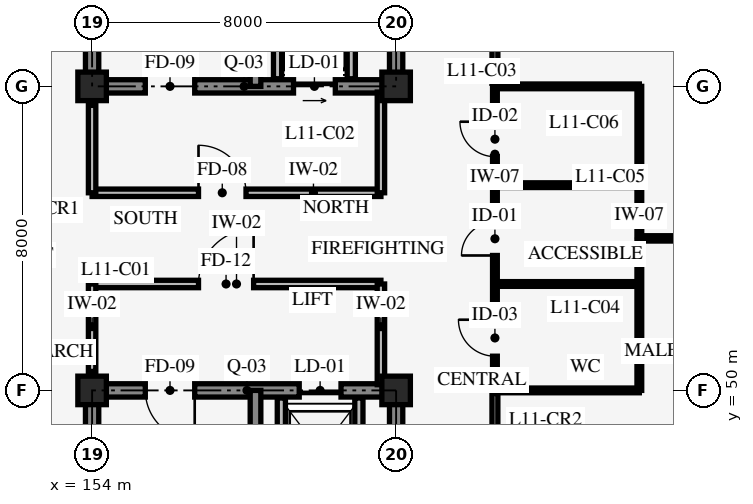
"""IFC4 building model, lengths in metres.
Left out: names, types, materials, properties, quantities, classifications, styles, units other than length and angle.
Written with IfcOpenShell. Run it as: python <this file> out.ifc"""

import sys

from ifc_helpers import new_model, si_unit, direction, frame, frame_2d, origin, origin_2d, place, context, subcontext, project, spatial, rectangle, extrude, element, fill, save


model = new_model("IFC4")
c1 = context("Model", 3, precision=1e-05, world=origin(), true_north=direction((0.0, 1.0)))
c2 = subcontext(c1, "Body", "Model", "MODEL_VIEW")
j1 = project(units=[si_unit("LENGTHUNIT", "METRE"), si_unit("PLANEANGLEUNIT", "RADIAN")], contexts=[c1])
p1 = place(None, origin())
s1 = spatial("IfcSite", under=j1, at=p1, CompositionType="ELEMENT")
p2 = place(p1, origin())
s2 = spatial("IfcBuilding", under=s1, at=p2, CompositionType="ELEMENT")
p3 = place(p2, frame((0.0, 0.0, 44.4)))
s3 = spatial("IfcBuildingStorey", under=s2, at=p3, CompositionType="ELEMENT", Elevation=44.4)
p4 = place(p3, frame((162.0, 42.0, 0.0), z_axis=(0.0, 0.0, 1.0), x_axis=(0.0, 1.0, 0.0)))
e1 = element("IfcWall", 1, at=p4, inside=s3, PredefinedType="SHEAR", context=c2, shape_type="SweptSolid", body=[
    extrude(rectangle(XDim=8.0, YDim=0.35, at=frame_2d((4.0, 0.0))), origin(), (0.0, 0.0, 1.0), 3.95),
])
p5 = place(p4, frame((3.175, 0.0, 0.0)))
e2 = element("IfcOpeningElement", 2, at=p5, cuts=e1, PredefinedType="OPENING", context=c2, shape_type="SweptSolid", body=[
    extrude(rectangle(XDim=1.05, YDim=2.2, at=frame_2d((0.525, 1.1))), frame((0.0, 0.185, 0.0), z_axis=(0.0, -1.0, 0.0), x_axis=(1.0, 0.0, 0.0)), (0.0, 0.0, 1.0), 0.37),
])
p6 = place(p3, frame((162.0, 50.0, 0.0), z_axis=(0.0, 0.0, 1.0), x_axis=(-1.0, 0.0, 0.0)))
e3 = element("IfcWall", 3, at=p6, inside=s3, PredefinedType="SHEAR", context=c2, shape_type="SweptSolid", body=[
    extrude(rectangle(XDim=8.0, YDim=0.35, at=frame_2d((4.0, 0.0))), origin(), (0.0, 0.0, 1.0), 3.95),
])
p7 = place(p6, frame((5.3, 0.0, 0.0)))
e4 = element("IfcOpeningElement", 4, at=p7, cuts=e3, PredefinedType="OPENING", context=c2, shape_type="SweptSolid", body=[
    extrude(rectangle(XDim=1.3, YDim=2.15, at=frame_2d((0.65, 1.075))), frame((0.0, 0.185, 0.0), z_axis=(0.0, -1.0, 0.0), x_axis=(1.0, 0.0, 0.0)), (0.0, 0.0, 1.0), 0.37),
])
p8 = place(p6, frame((1.45, 0.0, 0.0)))
e5 = element("IfcOpeningElement", 5, at=p8, cuts=e3, PredefinedType="OPENING", context=c2, shape_type="SweptSolid", body=[
    extrude(rectangle(XDim=1.1, YDim=2.2, at=frame_2d((0.55, 1.1))), frame((0.0, 0.185, 0.0), z_axis=(0.0, -1.0, 0.0), x_axis=(1.0, 0.0, 0.0)), (0.0, 0.0, 1.0), 0.37),
])
p9 = place(p3, frame((154.0, 50.0, 0.0), z_axis=(0.0, 0.0, 1.0), x_axis=(0.0, -1.0, 0.0)))
e6 = element("IfcWall", 6, at=p9, inside=s3, PredefinedType="SHEAR", context=c2, shape_type="SweptSolid", body=[
    extrude(rectangle(XDim=8.0, YDim=0.35, at=frame_2d((4.0, 0.0))), origin(), (0.0, 0.0, 1.0), 3.95),
])
p10 = place(p3, frame((158.3, 42.0, 0.0), z_axis=(0.0, 0.0, 1.0), x_axis=(0.0, 1.0, 0.0)))
e7 = element("IfcWall", 7, at=p10, inside=s3, PredefinedType="SHEAR", context=c2, shape_type="SweptSolid", body=[
    extrude(rectangle(XDim=8.0, YDim=0.28, at=frame_2d((4.0, 0.0))), origin(), (0.0, 0.0, 1.0), 3.95),
])
p11 = place(p3, frame((154.0, 58.0, 0.0), z_axis=(0.0, 0.0, 1.0), x_axis=(1.0, 0.0, 0.0)))
e8 = element("IfcWall", 8, at=p11, inside=s3, PredefinedType="SHEAR", context=c2, shape_type="SweptSolid", body=[
    extrude(rectangle(XDim=8.0, YDim=0.35, at=frame_2d((4.0, 0.0))), origin(), (0.0, 0.0, 1.0), 3.95),
])
p12 = place(p11, frame((1.4, 0.0, 0.0)))
e9 = element("IfcOpeningElement", 9, at=p12, cuts=e8, PredefinedType="OPENING", context=c2, shape_type="SweptSolid", body=[
    extrude(rectangle(XDim=1.3, YDim=2.15, at=frame_2d((0.65, 1.075))), frame((0.0, 0.185, 0.0), z_axis=(0.0, -1.0, 0.0), x_axis=(1.0, 0.0, 0.0)), (0.0, 0.0, 1.0), 0.37),
])
p13 = place(p11, frame((5.3, 0.0, 0.0)))
e10 = element("IfcOpeningElement", 10, at=p13, cuts=e8, PredefinedType="OPENING", context=c2, shape_type="SweptSolid", body=[
    extrude(rectangle(XDim=1.1, YDim=2.2, at=frame_2d((0.55, 1.1))), frame((0.0, 0.185, 0.0), z_axis=(0.0, -1.0, 0.0), x_axis=(1.0, 0.0, 0.0)), (0.0, 0.0, 1.0), 0.37),
])
p14 = place(p3, frame((162.0, 58.0, 0.0), z_axis=(0.0, 0.0, 1.0), x_axis=(0.0, 1.0, 0.0)))
e11 = element("IfcWall", 11, at=p14, inside=s3, PredefinedType="SHEAR", context=c2, shape_type="SweptSolid", body=[
    extrude(rectangle(XDim=8.0, YDim=0.35, at=frame_2d((4.0, 0.0))), origin(), (0.0, 0.0, 1.0), 3.95),
])
p15 = place(p14, frame((3.275, 0.0, 0.0)))
e12 = element("IfcOpeningElement", 12, at=p15, cuts=e11, PredefinedType="OPENING", context=c2, shape_type="SweptSolid", body=[
    extrude(rectangle(XDim=1.05, YDim=2.2, at=frame_2d((0.525, 1.1))), frame((0.0, 0.185, 0.0), z_axis=(0.0, -1.0, 0.0), x_axis=(1.0, 0.0, 0.0)), (0.0, 0.0, 1.0), 0.37),
])
p16 = place(p14, frame((5.45, 0.0, 0.0)))
e13 = element("IfcOpeningElement", 13, at=p16, cuts=e11, PredefinedType="OPENING", context=c2, shape_type="SweptSolid", body=[
    extrude(rectangle(XDim=1.4, YDim=2.3, at=frame_2d((0.7, 1.15))), frame((0.0, 0.185, 0.0), z_axis=(0.0, -1.0, 0.0), x_axis=(1.0, 0.0, 0.0)), (0.0, 0.0, 1.0), 0.37),
])
p17 = place(p3, frame((154.0, 66.0, 0.0), z_axis=(0.0, 0.0, 1.0), x_axis=(0.0, -1.0, 0.0)))
e14 = element("IfcWall", 14, at=p17, inside=s3, PredefinedType="SHEAR", context=c2, shape_type="SweptSolid", body=[
    extrude(rectangle(XDim=8.0, YDim=0.35, at=frame_2d((4.0, 0.0))), origin(), (0.0, 0.0, 1.0), 3.95),
])
p18 = place(p3, frame((158.3, 58.0, 0.0), z_axis=(0.0, 0.0, 1.0), x_axis=(0.0, 1.0, 0.0)))
e15 = element("IfcWall", 15, at=p18, inside=s3, PredefinedType="SHEAR", context=c2, shape_type="SweptSolid", body=[
    extrude(rectangle(XDim=8.0, YDim=0.28, at=frame_2d((4.0, 0.0))), origin(), (0.0, 0.0, 1.0), 3.95),
])
for number, where, z_axis, x_axis in (
    (16, (154.0, 50.0, 0.0), (0.0, 0.0, 1.0), (1.0, 0.0, 0.0)),
    (17, (154.0, 58.0, 0.0), (0.0, 0.0, 1.0), (1.0, 0.0, 0.0)),
    (18, (162.0, 50.0, 0.0), (0.0, 0.0, 1.0), (1.0, 0.0, 0.0)),
    (19, (162.0, 58.0, 0.0), (0.0, 0.0, 1.0), (1.0, 0.0, 0.0)),
):
    element("IfcColumn", number, at=place(p3, frame(where, z_axis=z_axis, x_axis=x_axis)), inside=s3, PredefinedType="COLUMN", context=c2, shape_type="SweptSolid", body=[
        extrude(rectangle(XDim=0.75, YDim=0.75, at=origin_2d()), origin(), (0.0, 0.0, 1.0), 4.2),
    ])
for number, where, z_axis, x_axis in (
    (20, (158.98, 47.02, 0.0), (0.0, 0.0, 1.0), (0.0, 1.0, 0.0)),
    (21, (161.02, 47.02, 0.0), (0.0, 0.0, 1.0), (0.0, 1.0, 0.0)),
):
    element("IfcWall", number, at=place(p3, frame(where, z_axis=z_axis, x_axis=x_axis)), inside=s3, PredefinedType="STANDARD", context=c2, shape_type="SweptSolid", body=[
        extrude(rectangle(XDim=2.78, YDim=0.215, at=frame_2d((1.39, 0.0))), origin(), (0.0, 0.0, 1.0), 3.9),
    ])
for number, where, z_axis, x_axis in (
    (22, (160.82, 58.2, 0.0), (0.0, 0.0, 1.0), (0.0, 1.0, 0.0)),
    (23, (158.88, 58.2, 0.0), (0.0, 0.0, 1.0), (0.0, 1.0, 0.0)),
):
    element("IfcWall", number, at=place(p3, frame(where, z_axis=z_axis, x_axis=x_axis)), inside=s3, PredefinedType="STANDARD", context=c2, shape_type="SweptSolid", body=[
        extrude(rectangle(XDim=2.55, YDim=0.215, at=frame_2d((1.275, 0.0))), origin(), (0.0, 0.0, 1.0), 3.9),
    ])
p19 = place(p3, frame((154.0, 52.8, 0.0), z_axis=(0.0, 0.0, 1.0), x_axis=(1.0, 0.0, 0.0)))
e24 = element("IfcWall", 24, at=p19, inside=s3, PredefinedType="STANDARD", context=c2, shape_type="SweptSolid", body=[
    extrude(rectangle(XDim=7.6, YDim=0.195, at=frame_2d((3.8, 0.0))), origin(), (0.0, 0.0, 1.0), 3.9),
])
p20 = place(p19, frame((2.8, 0.0, 0.0)))
e25 = element("IfcOpeningElement", 25, at=p20, cuts=e24, PredefinedType="OPENING", context=c2, shape_type="SweptSolid", body=[
    extrude(rectangle(XDim=1.45, YDim=2.2, at=frame_2d((0.725, 1.1))), frame((0.0, 0.107, 0.0), z_axis=(0.0, -1.0, 0.0), x_axis=(1.0, 0.0, 0.0)), (0.0, 0.0, 1.0), 0.215),
])
p21 = place(p3, frame((161.6, 50.15, 0.0), z_axis=(0.0, 0.0, 1.0), x_axis=(0.0, 1.0, 0.0)))
e26 = element("IfcWall", 26, at=p21, inside=s3, PredefinedType="STANDARD", context=c2, shape_type="SweptSolid", body=[
    extrude(rectangle(XDim=2.65, YDim=0.195, at=frame_2d((1.325, 0.0))), origin(), (0.0, 0.0, 1.0), 3.24),
])
p22 = place(p3, frame((154.0, 50.5, 0.0), z_axis=(0.0, 0.0, 1.0), x_axis=(0.0, 1.0, 0.0)))
e27 = element("IfcWall", 27, at=p22, inside=s3, PredefinedType="STANDARD", context=c2, shape_type="SweptSolid", body=[
    extrude(rectangle(XDim=2.3, YDim=0.195, at=frame_2d((1.15, 0.0))), origin(), (0.0, 0.0, 1.0), 3.24),
])
p23 = place(p3, frame((154.0, 55.2, 0.0), z_axis=(0.0, 0.0, 1.0), x_axis=(1.0, 0.0, 0.0)))
e28 = element("IfcWall", 28, at=p23, inside=s3, PredefinedType="STANDARD", context=c2, shape_type="SweptSolid", body=[
    extrude(rectangle(XDim=7.6, YDim=0.195, at=frame_2d((3.8, 0.0))), origin(), (0.0, 0.0, 1.0), 3.9),
])
p24 = place(p23, frame((2.8, 0.0, 0.0)))
e29 = element("IfcOpeningElement", 29, at=p24, cuts=e28, PredefinedType="OPENING", context=c2, shape_type="SweptSolid", body=[
    extrude(rectangle(XDim=1.25, YDim=2.15, at=frame_2d((0.625, 1.075))), frame((0.0, 0.107, 0.0), z_axis=(0.0, -1.0, 0.0), x_axis=(1.0, 0.0, 0.0)), (0.0, 0.0, 1.0), 0.215),
])
p25 = place(p3, frame((161.6, 55.2, 0.0), z_axis=(0.0, 0.0, 1.0), x_axis=(0.0, 1.0, 0.0)))
e30 = element("IfcWall", 30, at=p25, inside=s3, PredefinedType="STANDARD", context=c2, shape_type="SweptSolid", body=[
    extrude(rectangle(XDim=2.65, YDim=0.195, at=frame_2d((1.325, 0.0))), origin(), (0.0, 0.0, 1.0), 3.24),
])
p26 = place(p3, frame((154.0, 55.2, 0.0), z_axis=(0.0, 0.0, 1.0), x_axis=(0.0, 1.0, 0.0)))
e31 = element("IfcWall", 31, at=p26, inside=s3, PredefinedType="STANDARD", context=c2, shape_type="SweptSolid", body=[
    extrude(rectangle(XDim=2.3, YDim=0.195, at=frame_2d((1.15, 0.0))), origin(), (0.0, 0.0, 1.0), 3.24),
])
p27 = place(p3, frame((164.6, 50.0, 0.0), z_axis=(0.0, 0.0, 1.0), x_axis=(0.0, 1.0, 0.0)))
e32 = element("IfcWall", 32, at=p27, inside=s3, PredefinedType="STANDARD", context=c2, shape_type="SweptSolid", body=[
    extrude(rectangle(XDim=8.0, YDim=0.125, at=frame_2d((4.0, 0.0))), origin(), (0.0, 0.0, 1.0), 3.9),
])
p28 = place(p27, frame((0.9, 0.0, 0.0)))
e33 = element("IfcOpeningElement", 33, at=p28, cuts=e32, PredefinedType="OPENING", context=c2, shape_type="SweptSolid", body=[
    extrude(rectangle(XDim=0.96, YDim=2.08, at=frame_2d((0.48, 1.04))), frame((0.0, 0.073, 0.0), z_axis=(0.0, -1.0, 0.0), x_axis=(1.0, 0.0, 0.0)), (0.0, 0.0, 1.0), 0.145),
])
p29 = place(p27, frame((3.55, 0.0, 0.0)))
e34 = element("IfcOpeningElement", 34, at=p29, cuts=e32, PredefinedType="OPENING", context=c2, shape_type="SweptSolid", body=[
    extrude(rectangle(XDim=0.88, YDim=2.05, at=frame_2d((0.44, 1.025))), frame((0.0, 0.073, 0.0), z_axis=(0.0, -1.0, 0.0), x_axis=(1.0, 0.0, 0.0)), (0.0, 0.0, 1.0), 0.145),
])
p30 = place(p27, frame((6.15, 0.0, 0.0)))
e35 = element("IfcOpeningElement", 35, at=p30, cuts=e32, PredefinedType="OPENING", context=c2, shape_type="SweptSolid", body=[
    extrude(rectangle(XDim=0.92, YDim=2.05, at=frame_2d((0.46, 1.025))), frame((0.0, 0.073, 0.0), z_axis=(0.0, -1.0, 0.0), x_axis=(1.0, 0.0, 0.0)), (0.0, 0.0, 1.0), 0.145),
])
p31 = place(p3, frame((168.4, 50.0, 0.0), z_axis=(0.0, 0.0, 1.0), x_axis=(0.0, 1.0, 0.0)))
e36 = element("IfcWall", 36, at=p31, inside=s3, PredefinedType="STANDARD", context=c2, shape_type="SweptSolid", body=[
    extrude(rectangle(XDim=8.0, YDim=0.125, at=frame_2d((4.0, 0.0))), origin(), (0.0, 0.0, 1.0), 3.9),
])
p32 = place(p3, frame((164.6, 50.0, 0.0), z_axis=(0.0, 0.0, 1.0), x_axis=(1.0, 0.0, 0.0)))
e37 = element("IfcWall", 37, at=p32, inside=s3, PredefinedType="STANDARD", context=c2, shape_type="SweptSolid", body=[
    extrude(rectangle(XDim=3.8, YDim=0.125, at=frame_2d((1.9, 0.0))), origin(), (0.0, 0.0, 1.0), 3.19),
])
for number, where, z_axis, x_axis in (
    (38, (164.6, 52.8, 0.0), (0.0, 0.0, 1.0), (1.0, 0.0, 0.0)),
    (39, (164.6, 55.4, 0.0), (0.0, 0.0, 1.0), (1.0, 0.0, 0.0)),
):
    element("IfcWall", number, at=place(p3, frame(where, z_axis=z_axis, x_axis=x_axis)), inside=s3, PredefinedType="STANDARD", context=c2, shape_type="SweptSolid", body=[
        extrude(rectangle(XDim=3.8, YDim=0.125, at=frame_2d((1.9, 0.0))), origin(), (0.0, 0.0, 1.0), 3.9),
    ])
p33 = place(p3, frame((164.6, 58.0, 0.0), z_axis=(0.0, 0.0, 1.0), x_axis=(1.0, 0.0, 0.0)))
e40 = element("IfcWall", 40, at=p33, inside=s3, PredefinedType="STANDARD", context=c2, shape_type="SweptSolid", body=[
    extrude(rectangle(XDim=3.8, YDim=0.125, at=frame_2d((1.9, 0.0))), origin(), (0.0, 0.0, 1.0), 3.19),
])
p34 = place(p3, frame((164.6, 42.12, 0.0), z_axis=(0.0, 0.0, 1.0), x_axis=(0.0, 1.0, 0.0)))
e41 = element("IfcWall", 41, at=p34, inside=s3, PredefinedType="STANDARD", context=c2, shape_type="SweptSolid", body=[
    extrude(rectangle(XDim=7.8, YDim=0.155, at=frame_2d((3.9, 0.0))), origin(), (0.0, 0.0, 1.0), 3.9),
])
p35 = place(p34, frame((3.325, 0.0, 0.0)))
e42 = element("IfcOpeningElement", 42, at=p35, cuts=e41, PredefinedType="OPENING", context=c2, shape_type="SweptSolid", body=[
    extrude(rectangle(XDim=1.15, YDim=2.1, at=frame_2d((0.575, 1.05))), frame((0.0, 0.087, 0.0), z_axis=(0.0, -1.0, 0.0), x_axis=(1.0, 0.0, 0.0)), (0.0, 0.0, 1.0), 0.175),
])
p36 = place(p3, frame((168.4, 54.0, 0.0), z_axis=(0.0, 0.0, 1.0), x_axis=(1.0, 0.0, 0.0)))
e43 = element("IfcWall", 43, at=p36, inside=s3, PredefinedType="STANDARD", context=c2, shape_type="SweptSolid", body=[
    extrude(rectangle(XDim=8.96, YDim=0.14, at=frame_2d((4.48, 0.0))), origin(), (0.0, 0.0, 1.0), 3.9),
])
p37 = place(p36, frame((3.67, 0.0, 0.0)))
e44 = element("IfcOpeningElement", 44, at=p37, cuts=e43, PredefinedType="OPENING", context=c2, shape_type="SweptSolid", body=[
    extrude(rectangle(XDim=1.62, YDim=2.22, at=frame_2d((0.81, 1.11))), frame((0.0, 0.08, 0.0), z_axis=(0.0, -1.0, 0.0), x_axis=(1.0, 0.0, 0.0)), (0.0, 0.0, 1.0), 0.16),
])
p38 = place(p3, frame((164.6, 58.08, 0.0), z_axis=(0.0, 0.0, 1.0), x_axis=(0.0, 1.0, 0.0)))
e45 = element("IfcWall", 45, at=p38, inside=s3, PredefinedType="STANDARD", context=c2, shape_type="SweptSolid", body=[
    extrude(rectangle(XDim=7.8, YDim=0.155, at=frame_2d((3.9, 0.0))), origin(), (0.0, 0.0, 1.0), 3.9),
])
p39 = place(p38, frame((3.3, 0.0, 0.0)))
e46 = element("IfcOpeningElement", 46, at=p39, cuts=e45, PredefinedType="OPENING", context=c2, shape_type="SweptSolid", body=[
    extrude(rectangle(XDim=1.2, YDim=2.1, at=frame_2d((0.6, 1.05))), frame((0.0, 0.087, 0.0), z_axis=(0.0, -1.0, 0.0), x_axis=(1.0, 0.0, 0.0)), (0.0, 0.0, 1.0), 0.175),
])
p40 = place(p7, origin())
e47 = element("IfcDoor", 47, at=p40, inside=s3, OperationType="SINGLE_SWING_LEFT", PredefinedType="DOOR", context=c2, shape_type="SweptSolid", body=[
    extrude(rectangle(XDim=1.3, YDim=2.15, at=frame_2d((0.65, 1.075))), frame((0.0, 0.025, 0.0), z_axis=(0.0, -1.0, 0.0), x_axis=(1.0, 0.0, 0.0)), (0.0, 0.0, 1.0), 0.05),
])
fill(e4, e47)
p41 = place(p8, origin())
e48 = element("IfcDoor", 48, at=p41, inside=s3, OperationType="SLIDING_TO_LEFT", PredefinedType="DOOR", context=c2, shape_type="SweptSolid", body=[
    extrude(rectangle(XDim=1.1, YDim=2.2, at=frame_2d((0.55, 1.1))), frame((0.0, 0.025, 0.0), z_axis=(0.0, -1.0, 0.0), x_axis=(1.0, 0.0, 0.0)), (0.0, 0.0, 1.0), 0.05),
])
fill(e5, e48)
p42 = place(p12, origin())
e49 = element("IfcDoor", 49, at=p42, inside=s3, OperationType="SINGLE_SWING_RIGHT", PredefinedType="DOOR", context=c2, shape_type="SweptSolid", body=[
    extrude(rectangle(XDim=1.3, YDim=2.15, at=frame_2d((0.65, 1.075))), frame((0.0, 0.025, 0.0), z_axis=(0.0, -1.0, 0.0), x_axis=(1.0, 0.0, 0.0)), (0.0, 0.0, 1.0), 0.05),
])
fill(e9, e49)
p43 = place(p13, origin())
e50 = element("IfcDoor", 50, at=p43, inside=s3, OperationType="SLIDING_TO_RIGHT", PredefinedType="DOOR", context=c2, shape_type="SweptSolid", body=[
    extrude(rectangle(XDim=1.1, YDim=2.2, at=frame_2d((0.55, 1.1))), frame((0.0, 0.025, 0.0), z_axis=(0.0, -1.0, 0.0), x_axis=(1.0, 0.0, 0.0)), (0.0, 0.0, 1.0), 0.05),
])
fill(e10, e50)
p44 = place(p20, origin())
e51 = element("IfcDoor", 51, at=p44, inside=s3, OperationType="SINGLE_SWING_RIGHT", PredefinedType="DOOR", context=c2, shape_type="SweptSolid", body=[
    extrude(rectangle(XDim=1.45, YDim=2.2, at=frame_2d((0.725, 1.1))), frame((0.0, 0.025, 0.0), z_axis=(0.0, -1.0, 0.0), x_axis=(1.0, 0.0, 0.0)), (0.0, 0.0, 1.0), 0.05),
])
fill(e25, e51)
p45 = place(p24, origin())
e52 = element("IfcDoor", 52, at=p45, inside=s3, OperationType="SINGLE_SWING_LEFT", PredefinedType="DOOR", context=c2, shape_type="SweptSolid", body=[
    extrude(rectangle(XDim=1.25, YDim=2.15, at=frame_2d((0.625, 1.075))), frame((0.0, 0.025, 0.0), z_axis=(0.0, -1.0, 0.0), x_axis=(1.0, 0.0, 0.0)), (0.0, 0.0, 1.0), 0.05),
])
fill(e29, e52)
p46 = place(p28, origin())
e53 = element("IfcDoor", 53, at=p46, inside=s3, OperationType="SINGLE_SWING_RIGHT", PredefinedType="DOOR", context=c2, shape_type="SweptSolid", body=[
    extrude(rectangle(XDim=0.96, YDim=2.08, at=frame_2d((0.48, 1.04))), frame((0.0, 0.025, 0.0), z_axis=(0.0, -1.0, 0.0), x_axis=(1.0, 0.0, 0.0)), (0.0, 0.0, 1.0), 0.05),
])
fill(e33, e53)
p47 = place(p29, origin())
e54 = element("IfcDoor", 54, at=p47, inside=s3, OperationType="SINGLE_SWING_LEFT", PredefinedType="DOOR", context=c2, shape_type="SweptSolid", body=[
    extrude(rectangle(XDim=0.88, YDim=2.05, at=frame_2d((0.44, 1.025))), frame((0.0, 0.025, 0.0), z_axis=(0.0, -1.0, 0.0), x_axis=(1.0, 0.0, 0.0)), (0.0, 0.0, 1.0), 0.05),
])
fill(e34, e54)
p48 = place(p30, origin())
e55 = element("IfcDoor", 55, at=p48, inside=s3, OperationType="SINGLE_SWING_RIGHT", PredefinedType="DOOR", context=c2, shape_type="SweptSolid", body=[
    extrude(rectangle(XDim=0.92, YDim=2.05, at=frame_2d((0.46, 1.025))), frame((0.0, 0.025, 0.0), z_axis=(0.0, -1.0, 0.0), x_axis=(1.0, 0.0, 0.0)), (0.0, 0.0, 1.0), 0.05),
])
fill(e35, e55)
save(model, sys.argv[1])
